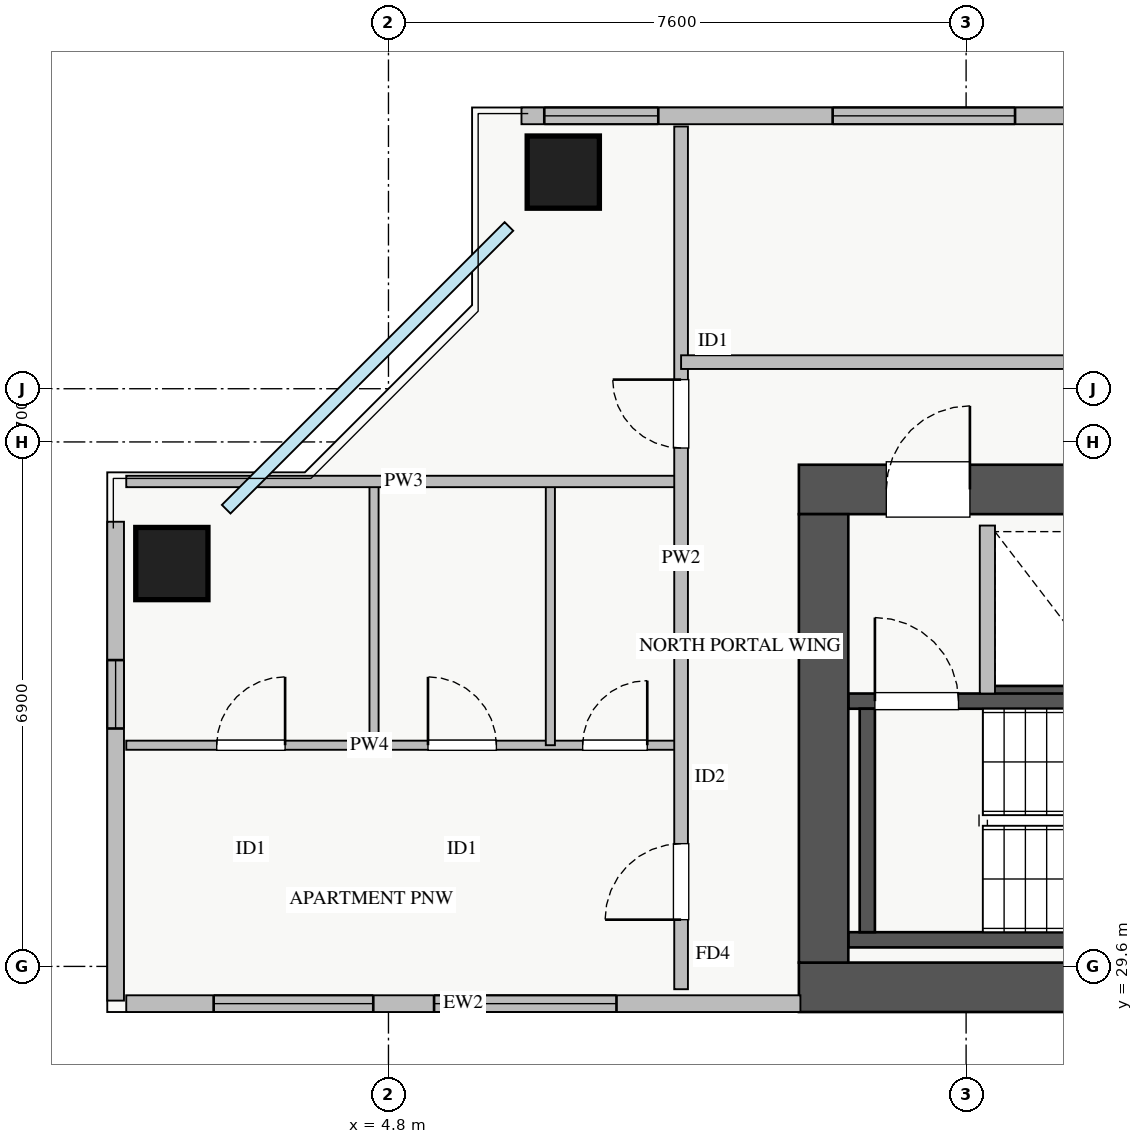
"""IFC4 building model, lengths in metres.
Left out: names, types, materials, properties, quantities, classifications, styles, units other than length and angle.
Written with IfcOpenShell. Run it as: python <this file> out.ifc"""

import sys

from ifc_helpers import new_model, si_unit, direction, frame, frame_2d, origin, origin_2d, place, context, subcontext, project, spatial, rectangle, extrude, source, transform, mapped, element, fill, save


model = new_model("IFC4")
c1 = context("Model", 3, precision=1e-05, world=origin(), true_north=direction((0.0, 1.0)))
c2 = subcontext(c1, "Body", "Model", "MODEL_VIEW")
j1 = project(units=[si_unit("LENGTHUNIT", "METRE"), si_unit("PLANEANGLEUNIT", "RADIAN")], contexts=[c1])
p1 = place(None, origin())
s1 = spatial("IfcSite", under=j1, at=p1, CompositionType="ELEMENT")
p2 = place(p1, origin())
s2 = spatial("IfcBuilding", under=s1, at=p2, CompositionType="ELEMENT")
p3 = place(p2, frame((0.0, 0.0, 160.0)))
s3 = spatial("IfcBuildingStorey", under=s2, at=p3, CompositionType="ELEMENT", Elevation=160.0)
p4 = place(p3, frame((12.68, 33.2, 0.0), z_axis=(0.0, 0.0, 1.0), x_axis=(1.0, 0.0, 0.0)))
e1 = element("IfcWall", 1, at=p4, inside=s3, PredefinedType="SHEAR", context=c2, shape_type="SweptSolid", body=[
    extrude(rectangle(XDim=1.94, YDim=0.18, at=frame_2d((0.97, 0.0))), origin(), (0.0, 0.0, 1.0), 3.07),
])
p5 = place(p3, frame((10.85, 29.95, 0.0), z_axis=(0.0, 0.0, 1.0), x_axis=(1.0, 0.0, 0.0)))
e2 = element("IfcWall", 2, at=p5, inside=s3, PredefinedType="SHEAR", context=c2, shape_type="SweptSolid", body=[
    extrude(rectangle(XDim=7.3, YDim=0.2, at=frame_2d((3.65, 0.0))), origin(), (0.0, 0.0, 1.0), 3.25),
])
p6 = place(p3, frame((10.85, 33.09, 0.0), z_axis=(0.0, 0.0, 1.0), x_axis=(1.0, 0.0, 0.0)))
e3 = element("IfcWall", 3, at=p6, inside=s3, PredefinedType="SHEAR", context=c2, shape_type="SweptSolid", body=[
    extrude(rectangle(XDim=7.3, YDim=0.2, at=frame_2d((3.65, 0.0))), origin(), (0.0, 0.0, 1.0), 3.25),
])
p7 = place(p6, frame((0.35, 0.0, 0.0)))
e4 = element("IfcOpeningElement", 4, at=p7, cuts=e3, PredefinedType="OPENING", context=c2, shape_type="SweptSolid", body=[
    extrude(rectangle(XDim=1.1, YDim=2.05, at=frame_2d((0.55, 1.025))), frame((0.0, 0.11, 0.0), z_axis=(0.0, -1.0, 0.0), x_axis=(1.0, 0.0, 0.0)), (0.0, 0.0, 1.0), 0.22),
])
p8 = place(p3, frame((11.1, 30.05, 0.0), z_axis=(0.0, 0.0, 1.0), x_axis=(0.0, 1.0, 0.0)))
e5 = element("IfcWall", 5, at=p8, inside=s3, PredefinedType="SHEAR", context=c2, shape_type="SweptSolid", body=[
    extrude(rectangle(XDim=2.94, YDim=0.2, at=frame_2d((1.47, 0.0))), origin(), (0.0, 0.0, 1.0), 3.25),
])
p9 = place(p3, frame((10.2, 29.325, 0.0), z_axis=(0.0, 0.0, 1.0), x_axis=(1.0, 0.0, 0.0)))
e6 = element("IfcWall", 6, at=p9, inside=s3, PredefinedType="SHEAR", context=c2, shape_type="SweptSolid", body=[
    extrude(rectangle(XDim=17.6, YDim=0.65, at=frame_2d((8.8, 0.0))), origin(), (0.0, 0.0, 1.0), 3.25),
])
p10 = place(p3, frame((10.2, 35.875, 0.0), z_axis=(0.0, 0.0, 1.0), x_axis=(1.0, 0.0, 0.0)))
e7 = element("IfcWall", 7, at=p10, inside=s3, PredefinedType="SHEAR", context=c2, shape_type="SweptSolid", body=[
    extrude(rectangle(XDim=17.6, YDim=0.65, at=frame_2d((8.8, 0.0))), origin(), (0.0, 0.0, 1.0), 3.25),
])
p11 = place(p10, frame((1.15, 0.0, 0.0)))
e8 = element("IfcOpeningElement", 8, at=p11, cuts=e7, PredefinedType="OPENING", context=c2, shape_type="SweptSolid", body=[
    extrude(rectangle(XDim=1.1, YDim=2.05, at=frame_2d((0.55, 1.025))), frame((0.0, 0.335, 0.0), z_axis=(0.0, -1.0, 0.0), x_axis=(1.0, 0.0, 0.0)), (0.0, 0.0, 1.0), 0.67),
])
p12 = place(p10, frame((8.3, 0.0, 0.0)))
e9 = element("IfcOpeningElement", 9, at=p12, cuts=e7, PredefinedType="OPENING", context=c2, shape_type="SweptSolid", body=[
    extrude(rectangle(XDim=1.1, YDim=2.05, at=frame_2d((0.55, 1.025))), frame((0.0, 0.335, 0.0), z_axis=(0.0, -1.0, 0.0), x_axis=(1.0, 0.0, 0.0)), (0.0, 0.0, 1.0), 0.67),
])
p13 = place(p10, frame((4.9, 0.0, 0.0)))
e10 = element("IfcOpeningElement", 10, at=p13, cuts=e7, PredefinedType="OPENING", context=c2, shape_type="SweptSolid", body=[
    extrude(rectangle(XDim=1.1, YDim=2.05, at=frame_2d((0.55, 1.025))), frame((0.0, 0.335, 0.0), z_axis=(0.0, -1.0, 0.0), x_axis=(1.0, 0.0, 0.0)), (0.0, 0.0, 1.0), 0.67),
])
p14 = place(p10, frame((14.74, 0.0, 0.0)))
e11 = element("IfcOpeningElement", 11, at=p14, cuts=e7, PredefinedType="OPENING", context=c2, shape_type="SweptSolid", body=[
    extrude(rectangle(XDim=1.0, YDim=2.05, at=frame_2d((0.5, 1.025))), frame((0.0, 0.335, 0.0), z_axis=(0.0, -1.0, 0.0), x_axis=(1.0, 0.0, 0.0)), (0.0, 0.0, 1.0), 0.67),
])
p15 = place(p10, frame((10.25, 0.0, 0.0)))
e12 = element("IfcOpeningElement", 12, at=p15, cuts=e7, PredefinedType="OPENING", context=c2, shape_type="SweptSolid", body=[
    extrude(rectangle(XDim=1.0, YDim=2.05, at=frame_2d((0.5, 1.025))), frame((0.0, 0.335, 0.0), z_axis=(0.0, -1.0, 0.0), x_axis=(1.0, 0.0, 0.0)), (0.0, 0.0, 1.0), 0.67),
])
p16 = place(p10, frame((12.7, 0.0, 0.0)))
e13 = element("IfcOpeningElement", 13, at=p16, cuts=e7, PredefinedType="OPENING", context=c2, shape_type="SweptSolid", body=[
    extrude(rectangle(XDim=1.0, YDim=2.05, at=frame_2d((0.5, 1.025))), frame((0.0, 0.335, 0.0), z_axis=(0.0, -1.0, 0.0), x_axis=(1.0, 0.0, 0.0)), (0.0, 0.0, 1.0), 0.67),
])
p17 = place(p3, frame((10.525, 29.65, 0.0), z_axis=(0.0, 0.0, 1.0), x_axis=(0.0, 1.0, 0.0)))
e14 = element("IfcWall", 14, at=p17, inside=s3, PredefinedType="SHEAR", context=c2, shape_type="SweptSolid", body=[
    extrude(rectangle(XDim=5.9, YDim=0.65, at=frame_2d((2.95, 0.0))), origin(), (0.0, 0.0, 1.0), 3.25),
])
m1 = source(origin(), c2, "Body", "SweptSolid", [
    extrude(rectangle(XDim=0.95, YDim=0.95, at=origin_2d()), origin(), (0.0, 0.0, 1.0), 3.25),
])
for number, where, z_axis, x_axis in (
    (15, (7.1, 40.05, 0.0), (0.0, 0.0, 1.0), (1.0, 0.0, 0.0)),
    (16, (1.95, 34.9, 0.0), (0.0, 0.0, 1.0), (1.0, 0.0, 0.0)),
):
    element("IfcColumn", number, at=place(p3, frame(where, z_axis=z_axis, x_axis=x_axis)), inside=s3, PredefinedType="COLUMN", context=c2, shape_type="MappedRepresentation", body=[
        mapped(m1, transform((0.0, 0.0, 0.0), x_axis=(1.0, 0.0, 0.0), y_axis=(0.0, 1.0, 0.0), z_axis=(0.0, 0.0, 1.0), scale=1.0)),
    ])
p18 = place(p3, frame((1.35, 29.11, 0.0), z_axis=(0.0, 0.0, 1.0), x_axis=(1.0, 0.0, 0.0)))
e17 = element("IfcWall", 17, at=p18, inside=s3, PredefinedType="STANDARD", context=c2, shape_type="SweptSolid", body=[
    extrude(rectangle(XDim=8.87, YDim=0.22, at=frame_2d((4.435, 0.0))), origin(), (0.0, 0.0, 1.0), 2.61),
])
p19 = place(p18, frame((1.15, 0.0, 0.9)))
e18 = element("IfcOpeningElement", 18, at=p19, cuts=e17, PredefinedType="OPENING", context=c2, shape_type="SweptSolid", body=[
    extrude(rectangle(XDim=2.1, YDim=1.48, at=frame_2d((1.05, 0.74))), frame((0.0, 0.12, 0.0), z_axis=(0.0, -1.0, 0.0), x_axis=(1.0, 0.0, 0.0)), (0.0, 0.0, 1.0), 0.24),
])
p20 = place(p18, frame((4.05, 0.0, 0.9)))
e19 = element("IfcOpeningElement", 19, at=p20, cuts=e17, PredefinedType="OPENING", context=c2, shape_type="SweptSolid", body=[
    extrude(rectangle(XDim=2.4, YDim=1.5, at=frame_2d((1.2, 0.75))), frame((0.0, 0.12, 0.0), z_axis=(0.0, -1.0, 0.0), x_axis=(1.0, 0.0, 0.0)), (0.0, 0.0, 1.0), 0.24),
])
p21 = place(p3, frame((1.21, 29.15, 0.0), z_axis=(0.0, 0.0, 1.0), x_axis=(0.0, 1.0, 0.0)))
e20 = element("IfcWall", 20, at=p21, inside=s3, PredefinedType="STANDARD", context=c2, shape_type="SweptSolid", body=[
    extrude(rectangle(XDim=6.3, YDim=0.22, at=frame_2d((3.15, 0.0))), origin(), (0.0, 0.0, 1.0), 2.61),
])
p22 = place(p21, frame((3.58, 0.0, 0.9)))
e21 = element("IfcOpeningElement", 21, at=p22, cuts=e20, PredefinedType="OPENING", context=c2, shape_type="SweptSolid", body=[
    extrude(rectangle(XDim=0.9, YDim=1.2, at=frame_2d((0.45, 0.6))), frame((0.0, 0.12, 0.0), z_axis=(0.0, -1.0, 0.0), x_axis=(1.0, 0.0, 0.0)), (0.0, 0.0, 1.0), 0.24),
])
p23 = place(p3, frame((6.55, 40.79, 0.0), z_axis=(0.0, 0.0, 1.0), x_axis=(1.0, 0.0, 0.0)))
e22 = element("IfcWall", 22, at=p23, inside=s3, PredefinedType="STANDARD", context=c2, shape_type="SweptSolid", body=[
    extrude(rectangle(XDim=24.9, YDim=0.22, at=frame_2d((12.45, 0.0))), origin(), (0.0, 0.0, 1.0), 2.61),
])
p24 = place(p23, frame((0.3, 0.0, 0.9)))
e23 = element("IfcOpeningElement", 23, at=p24, cuts=e22, PredefinedType="OPENING", context=c2, shape_type="SweptSolid", body=[
    extrude(rectangle(XDim=1.5, YDim=1.5, at=frame_2d((0.75, 0.75))), frame((0.0, 0.12, 0.0), z_axis=(0.0, -1.0, 0.0), x_axis=(1.0, 0.0, 0.0)), (0.0, 0.0, 1.0), 0.24),
])
p25 = place(p23, frame((8.438, 0.0, 0.9)))
e24 = element("IfcOpeningElement", 24, at=p25, cuts=e22, PredefinedType="OPENING", context=c2, shape_type="SweptSolid", body=[
    extrude(rectangle(XDim=1.8, YDim=1.45, at=frame_2d((0.9, 0.725))), frame((0.0, 0.12, 0.0), z_axis=(0.0, -1.0, 0.0), x_axis=(1.0, 0.0, 0.0)), (0.0, 0.0, 1.0), 0.24),
])
p26 = place(p23, frame((14.813, 0.0, 0.9)))
e25 = element("IfcOpeningElement", 25, at=p26, cuts=e22, PredefinedType="OPENING", context=c2, shape_type="SweptSolid", body=[
    extrude(rectangle(XDim=1.5, YDim=1.45, at=frame_2d((0.75, 0.725))), frame((0.0, 0.12, 0.0), z_axis=(0.0, -1.0, 0.0), x_axis=(1.0, 0.0, 0.0)), (0.0, 0.0, 1.0), 0.24),
])
p27 = place(p23, frame((20.738, 0.0, 0.9)))
e26 = element("IfcOpeningElement", 26, at=p27, cuts=e22, PredefinedType="OPENING", context=c2, shape_type="SweptSolid", body=[
    extrude(rectangle(XDim=2.1, YDim=1.48, at=frame_2d((1.05, 0.74))), frame((0.0, 0.12, 0.0), z_axis=(0.0, -1.0, 0.0), x_axis=(1.0, 0.0, 0.0)), (0.0, 0.0, 1.0), 0.24),
])
p28 = place(p23, frame((4.094, 0.0, 0.9)))
e27 = element("IfcOpeningElement", 27, at=p28, cuts=e22, PredefinedType="OPENING", context=c2, shape_type="SweptSolid", body=[
    extrude(rectangle(XDim=2.4, YDim=1.5, at=frame_2d((1.2, 0.75))), frame((0.0, 0.12, 0.0), z_axis=(0.0, -1.0, 0.0), x_axis=(1.0, 0.0, 0.0)), (0.0, 0.0, 1.0), 0.24),
])
p29 = place(p3, frame((12.68, 33.19, 0.0), z_axis=(0.0, 0.0, 1.0), x_axis=(0.0, 1.0, 0.0)))
e28 = element("IfcWall", 28, at=p29, inside=s3, PredefinedType="PARTITIONING", context=c2, shape_type="SweptSolid", body=[
    extrude(rectangle(XDim=2.21, YDim=0.2, at=frame_2d((1.105, 0.0))), origin(), (0.0, 0.0, 1.0), 3.07),
])
p30 = place(p3, frame((1.35, 32.51, 0.0), z_axis=(0.0, 0.0, 1.0), x_axis=(1.0, 0.0, 0.0)))
e29 = element("IfcWall", 29, at=p30, inside=s3, PredefinedType="PLUMBINGWALL", context=c2, shape_type="SweptSolid", body=[
    extrude(rectangle(XDim=7.3, YDim=0.12, at=frame_2d((3.65, 0.0))), origin(), (0.0, 0.0, 1.0), 3.07),
])
p31 = place(p30, frame((1.19, 0.0, 0.0)))
e30 = element("IfcOpeningElement", 30, at=p31, cuts=e29, PredefinedType="OPENING", context=c2, shape_type="SweptSolid", body=[
    extrude(rectangle(XDim=0.9, YDim=2.05, at=frame_2d((0.45, 1.025))), frame((0.0, 0.07, 0.0), z_axis=(0.0, -1.0, 0.0), x_axis=(1.0, 0.0, 0.0)), (0.0, 0.0, 1.0), 0.14),
])
p32 = place(p30, frame((3.97, 0.0, 0.0)))
e31 = element("IfcOpeningElement", 31, at=p32, cuts=e29, PredefinedType="OPENING", context=c2, shape_type="SweptSolid", body=[
    extrude(rectangle(XDim=0.9, YDim=2.05, at=frame_2d((0.45, 1.025))), frame((0.0, 0.07, 0.0), z_axis=(0.0, -1.0, 0.0), x_axis=(1.0, 0.0, 0.0)), (0.0, 0.0, 1.0), 0.14),
])
p33 = place(p30, frame((6.005, 0.0, 0.0)))
e32 = element("IfcOpeningElement", 32, at=p33, cuts=e29, PredefinedType="OPENING", context=c2, shape_type="SweptSolid", body=[
    extrude(rectangle(XDim=0.85, YDim=2.05, at=frame_2d((0.425, 1.025))), frame((0.0, 0.07, 0.0), z_axis=(0.0, -1.0, 0.0), x_axis=(1.0, 0.0, 0.0)), (0.0, 0.0, 1.0), 0.14),
])
p34 = place(p3, frame((4.61, 32.51, 0.0), z_axis=(0.0, 0.0, 1.0), x_axis=(0.0, 1.0, 0.0)))
e33 = element("IfcWall", 33, at=p34, inside=s3, PredefinedType="PLUMBINGWALL", context=c2, shape_type="SweptSolid", body=[
    extrude(rectangle(XDim=3.47, YDim=0.12, at=frame_2d((1.735, 0.0))), origin(), (0.0, 0.0, 1.0), 3.07),
])
p35 = place(p3, frame((6.93, 32.51, 0.0), z_axis=(0.0, 0.0, 1.0), x_axis=(0.0, 1.0, 0.0)))
e34 = element("IfcWall", 34, at=p35, inside=s3, PredefinedType="PLUMBINGWALL", context=c2, shape_type="SweptSolid", body=[
    extrude(rectangle(XDim=3.47, YDim=0.12, at=frame_2d((1.735, 0.0))), origin(), (0.0, 0.0, 1.0), 2.565),
])
p36 = place(p3, frame((1.35, 35.98, 0.0), z_axis=(0.0, 0.0, 1.0), x_axis=(1.0, 0.0, 0.0)))
e35 = element("IfcWall", 35, at=p36, inside=s3, PredefinedType="PARTITIONING", context=c2, shape_type="SweptSolid", body=[
    extrude(rectangle(XDim=7.3, YDim=0.15, at=frame_2d((3.65, 0.0))), origin(), (0.0, 0.0, 1.0), 3.07),
])
p37 = place(p3, frame((8.65, 29.3, 0.0), z_axis=(0.0, 0.0, 1.0), x_axis=(0.0, 1.0, 0.0)))
e36 = element("IfcWall", 36, at=p37, inside=s3, PredefinedType="PARTITIONING", context=c2, shape_type="SweptSolid", body=[
    extrude(rectangle(XDim=11.35, YDim=0.18, at=frame_2d((5.675, 0.0))), origin(), (0.0, 0.0, 1.0), 3.07),
])
p38 = place(p37, frame((0.915, 0.0, 0.0)))
e37 = element("IfcOpeningElement", 37, at=p38, cuts=e36, PredefinedType="OPENING", context=c2, shape_type="SweptSolid", body=[
    extrude(rectangle(XDim=1.0, YDim=2.05, at=frame_2d((0.5, 1.025))), frame((0.0, 0.1, 0.0), z_axis=(0.0, -1.0, 0.0), x_axis=(1.0, 0.0, 0.0)), (0.0, 0.0, 1.0), 0.2),
])
p39 = place(p37, frame((7.12, 0.0, 0.0)))
e38 = element("IfcOpeningElement", 38, at=p39, cuts=e36, PredefinedType="OPENING", context=c2, shape_type="SweptSolid", body=[
    extrude(rectangle(XDim=0.9, YDim=2.05, at=frame_2d((0.45, 1.025))), frame((0.0, 0.1, 0.0), z_axis=(0.0, -1.0, 0.0), x_axis=(1.0, 0.0, 0.0)), (0.0, 0.0, 1.0), 0.2),
])
p40 = place(p3, frame((8.65, 37.55, 0.0), z_axis=(0.0, 0.0, 1.0), x_axis=(1.0, 0.0, 0.0)))
e39 = element("IfcWall", 39, at=p40, inside=s3, PredefinedType="PARTITIONING", context=c2, shape_type="SweptSolid", body=[
    extrude(rectangle(XDim=23.8, YDim=0.18, at=frame_2d((11.9, 0.0))), origin(), (0.0, 0.0, 1.0), 3.07),
])
p41 = place(p40, frame((5.425, 0.0, 0.0)))
e40 = element("IfcOpeningElement", 40, at=p41, cuts=e39, PredefinedType="OPENING", context=c2, shape_type="SweptSolid", body=[
    extrude(rectangle(XDim=1.0, YDim=2.05, at=frame_2d((0.5, 1.025))), frame((0.0, 0.1, 0.0), z_axis=(0.0, -1.0, 0.0), x_axis=(1.0, 0.0, 0.0)), (0.0, 0.0, 1.0), 0.2),
])
p42 = place(p40, frame((17.325, 0.0, 0.0)))
e41 = element("IfcOpeningElement", 41, at=p42, cuts=e39, PredefinedType="OPENING", context=c2, shape_type="SweptSolid", body=[
    extrude(rectangle(XDim=1.0, YDim=2.05, at=frame_2d((0.5, 1.025))), frame((0.0, 0.1, 0.0), z_axis=(0.0, -1.0, 0.0), x_axis=(1.0, 0.0, 0.0)), (0.0, 0.0, 1.0), 0.2),
])
m2 = source(origin(), c2, "Body", "SweptSolid", [
    extrude(rectangle(XDim=2.1, YDim=1.48, at=frame_2d((1.05, 0.74))), frame((0.0, 0.03, 0.0), z_axis=(0.0, -1.0, 0.0), x_axis=(1.0, 0.0, 0.0)), (0.0, 0.0, 1.0), 0.06),
])
p43 = place(p19, origin())
e42 = element("IfcWindow", 42, at=p43, inside=s3, PartitioningType="TRIPLE_PANEL_VERTICAL", PredefinedType="WINDOW", context=c2, shape_type="MappedRepresentation", body=[
    mapped(m2, transform((0.0, 0.0, 0.0), x_axis=(1.0, 0.0, 0.0), y_axis=(0.0, 1.0, 0.0), z_axis=(0.0, 0.0, 1.0), scale=1.0)),
])
fill(e18, e42)
m3 = source(origin(), c2, "Body", "SweptSolid", [
    extrude(rectangle(XDim=2.4, YDim=1.5, at=frame_2d((1.2, 0.75))), frame((0.0, 0.03, 0.0), z_axis=(0.0, -1.0, 0.0), x_axis=(1.0, 0.0, 0.0)), (0.0, 0.0, 1.0), 0.06),
])
p44 = place(p20, origin())
e43 = element("IfcWindow", 43, at=p44, inside=s3, PartitioningType="TRIPLE_PANEL_VERTICAL", PredefinedType="WINDOW", context=c2, shape_type="MappedRepresentation", body=[
    mapped(m3, transform((0.0, 0.0, 0.0), x_axis=(1.0, 0.0, 0.0), y_axis=(0.0, 1.0, 0.0), z_axis=(0.0, 0.0, 1.0), scale=1.0)),
])
fill(e19, e43)
m4 = source(origin(), c2, "Body", "SweptSolid", [
    extrude(rectangle(XDim=1.5, YDim=1.5, at=frame_2d((0.75, 0.75))), frame((0.0, 0.03, 0.0), z_axis=(0.0, -1.0, 0.0), x_axis=(1.0, 0.0, 0.0)), (0.0, 0.0, 1.0), 0.06),
])
p45 = place(p24, origin())
e44 = element("IfcWindow", 44, at=p45, inside=s3, PartitioningType="TRIPLE_PANEL_VERTICAL", PredefinedType="WINDOW", context=c2, shape_type="MappedRepresentation", body=[
    mapped(m4, transform((0.0, 0.0, 0.0), x_axis=(1.0, 0.0, 0.0), y_axis=(0.0, 1.0, 0.0), z_axis=(0.0, 0.0, 1.0), scale=1.0)),
])
fill(e23, e44)
m5 = source(origin(), c2, "Body", "SweptSolid", [
    extrude(rectangle(XDim=1.1, YDim=2.05, at=frame_2d((0.55, 1.025))), frame((0.0, 0.025, 0.0), z_axis=(0.0, -1.0, 0.0), x_axis=(1.0, 0.0, 0.0)), (0.0, 0.0, 1.0), 0.05),
])
p46 = place(p11, origin())
e45 = element("IfcDoor", 45, at=p46, inside=s3, OperationType="SINGLE_SWING_RIGHT", PredefinedType="DOOR", context=c2, shape_type="MappedRepresentation", body=[
    mapped(m5, transform((0.0, 0.0, 0.0), x_axis=(1.0, 0.0, 0.0), y_axis=(0.0, 1.0, 0.0), z_axis=(0.0, 0.0, 1.0), scale=1.0)),
])
fill(e8, e45)
p47 = place(p7, origin())
e46 = element("IfcDoor", 46, at=p47, inside=s3, OperationType="SINGLE_SWING_LEFT", PredefinedType="DOOR", context=c2, shape_type="MappedRepresentation", body=[
    mapped(m5, transform((0.0, 0.0, 0.0), x_axis=(1.0, 0.0, 0.0), y_axis=(0.0, 1.0, 0.0), z_axis=(0.0, 0.0, 1.0), scale=1.0)),
])
fill(e4, e46)
m6 = source(origin(), c2, "Body", "SweptSolid", [
    extrude(rectangle(XDim=0.9, YDim=2.05, at=frame_2d((0.45, 1.025))), frame((0.0, 0.025, 0.0), z_axis=(0.0, -1.0, 0.0), x_axis=(1.0, 0.0, 0.0)), (0.0, 0.0, 1.0), 0.05),
])
p48 = place(p31, origin())
e47 = element("IfcDoor", 47, at=p48, inside=s3, OperationType="SINGLE_SWING_RIGHT", PredefinedType="DOOR", context=c2, shape_type="MappedRepresentation", body=[
    mapped(m6, transform((0.0, 0.0, 0.0), x_axis=(1.0, 0.0, 0.0), y_axis=(0.0, 1.0, 0.0), z_axis=(0.0, 0.0, 1.0), scale=1.0)),
])
fill(e30, e47)
p49 = place(p32, origin())
e48 = element("IfcDoor", 48, at=p49, inside=s3, OperationType="SINGLE_SWING_LEFT", PredefinedType="DOOR", context=c2, shape_type="MappedRepresentation", body=[
    mapped(m6, transform((0.0, 0.0, 0.0), x_axis=(1.0, 0.0, 0.0), y_axis=(0.0, 1.0, 0.0), z_axis=(0.0, 0.0, 1.0), scale=1.0)),
])
fill(e31, e48)
m7 = source(origin(), c2, "Body", "SweptSolid", [
    extrude(rectangle(XDim=0.85, YDim=2.05, at=frame_2d((0.425, 1.025))), frame((0.0, 0.025, 0.0), z_axis=(0.0, -1.0, 0.0), x_axis=(1.0, 0.0, 0.0)), (0.0, 0.0, 1.0), 0.05),
])
p50 = place(p33, origin())
e49 = element("IfcDoor", 49, at=p50, inside=s3, OperationType="SINGLE_SWING_RIGHT", PredefinedType="DOOR", context=c2, shape_type="MappedRepresentation", body=[
    mapped(m7, transform((0.0, 0.0, 0.0), x_axis=(1.0, 0.0, 0.0), y_axis=(0.0, 1.0, 0.0), z_axis=(0.0, 0.0, 1.0), scale=1.0)),
])
fill(e32, e49)
m8 = source(origin(), c2, "Body", "SweptSolid", [
    extrude(rectangle(XDim=1.0, YDim=2.05, at=frame_2d((0.5, 1.025))), frame((0.0, 0.025, 0.0), z_axis=(0.0, -1.0, 0.0), x_axis=(1.0, 0.0, 0.0)), (0.0, 0.0, 1.0), 0.05),
])
p51 = place(p38, origin())
e50 = element("IfcDoor", 50, at=p51, inside=s3, OperationType="SINGLE_SWING_LEFT", PredefinedType="DOOR", context=c2, shape_type="MappedRepresentation", body=[
    mapped(m8, transform((0.0, 0.0, 0.0), x_axis=(1.0, 0.0, 0.0), y_axis=(0.0, 1.0, 0.0), z_axis=(0.0, 0.0, 1.0), scale=1.0)),
])
fill(e37, e50)
p52 = place(p39, origin())
e51 = element("IfcDoor", 51, at=p52, inside=s3, OperationType="SINGLE_SWING_RIGHT", PredefinedType="DOOR", context=c2, shape_type="MappedRepresentation", body=[
    mapped(m6, transform((0.0, 0.0, 0.0), x_axis=(1.0, 0.0, 0.0), y_axis=(0.0, 1.0, 0.0), z_axis=(0.0, 0.0, 1.0), scale=1.0)),
])
fill(e38, e51)
p53 = place(p28, origin())
e52 = element("IfcWindow", 52, at=p53, inside=s3, PartitioningType="TRIPLE_PANEL_VERTICAL", PredefinedType="WINDOW", context=c2, shape_type="MappedRepresentation", body=[
    mapped(m3, transform((0.0, 0.0, 0.0), x_axis=(1.0, 0.0, 0.0), y_axis=(0.0, 1.0, 0.0), z_axis=(0.0, 0.0, 1.0), scale=1.0)),
])
fill(e27, e52)
m9 = source(origin(), c2, "Body", "SweptSolid", [
    extrude(rectangle(XDim=0.9, YDim=1.2, at=frame_2d((0.45, 0.6))), frame((0.0, 0.03, 0.0), z_axis=(0.0, -1.0, 0.0), x_axis=(1.0, 0.0, 0.0)), (0.0, 0.0, 1.0), 0.06),
])
p54 = place(p22, origin())
e53 = element("IfcWindow", 53, at=p54, inside=s3, PartitioningType="SINGLE_PANEL", PredefinedType="WINDOW", context=c2, shape_type="MappedRepresentation", body=[
    mapped(m9, transform((0.0, 0.0, 0.0), x_axis=(1.0, 0.0, 0.0), y_axis=(0.0, 1.0, 0.0), z_axis=(0.0, 0.0, 1.0), scale=1.0)),
])
fill(e21, e53)
save(model, sys.argv[1])
